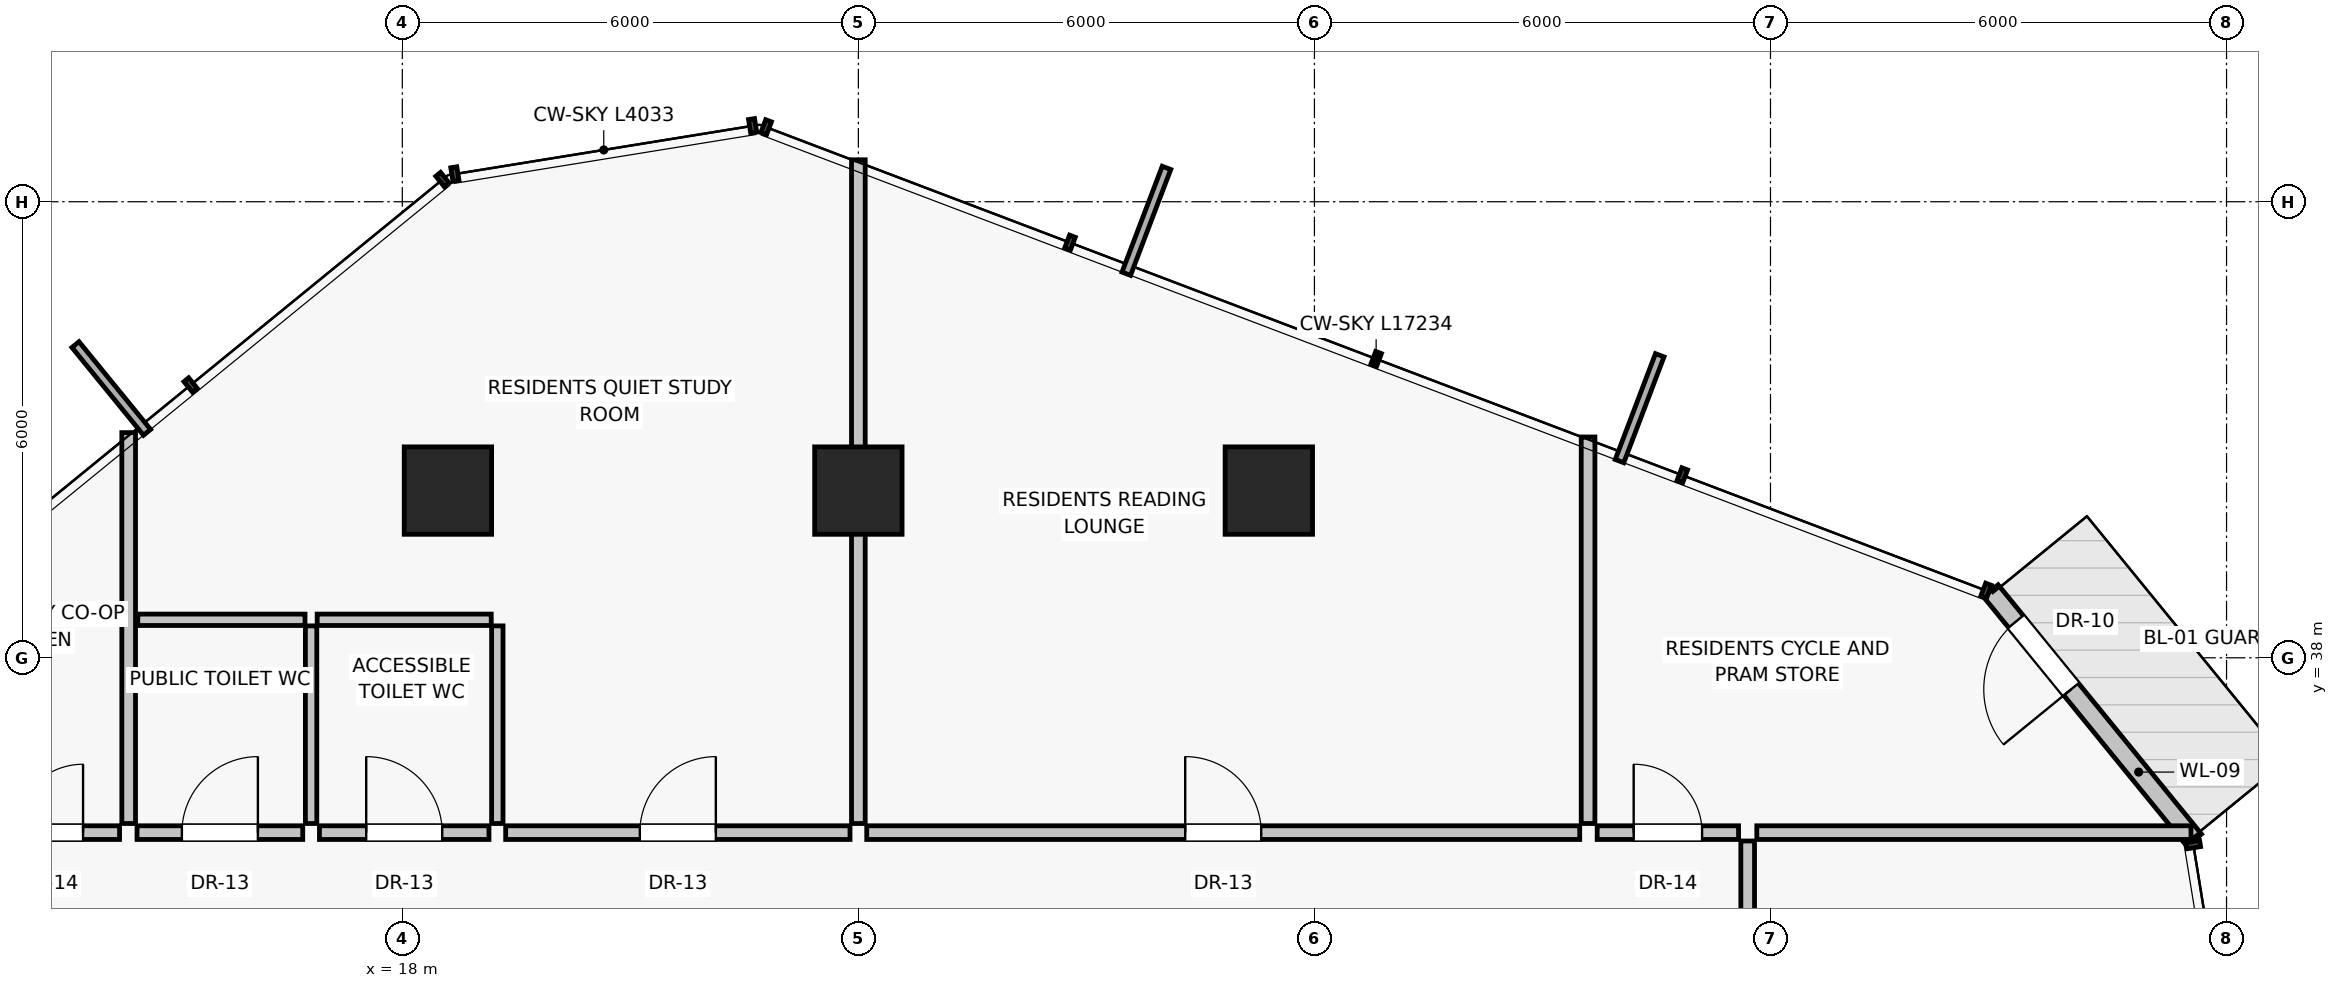
"""IFC4 building model, lengths in metres.
Left out: names, types, materials, properties, quantities, classifications, styles, units other than length and angle.
Written with IfcOpenShell. Run it as: python <this file> out.ifc"""

import sys

from ifc_helpers import new_model, si_unit, direction, frame, frame_2d, origin, origin_2d, place, context, subcontext, project, spatial, rectangle, extrude, source, transform, mapped, element, fill, save


model = new_model("IFC4")
c1 = context("Model", 3, precision=1e-05, world=origin(), true_north=direction((0.0, 1.0)))
c2 = subcontext(c1, "Body", "Model", "MODEL_VIEW")
j1 = project(units=[si_unit("LENGTHUNIT", "METRE"), si_unit("PLANEANGLEUNIT", "RADIAN")], contexts=[c1])
p1 = place(None, origin())
s1 = spatial("IfcSite", under=j1, at=p1, CompositionType="ELEMENT")
p2 = place(p1, origin())
s2 = spatial("IfcBuilding", under=s1, at=p2, CompositionType="ELEMENT")
p3 = place(p2, frame((0.0, 0.0, 158.75)))
s3 = spatial("IfcBuildingStorey", under=s2, at=p3, CompositionType="ELEMENT", Elevation=158.75)
for number, where, z_axis, x_axis in (
    (1, (29.4, 40.2, 0.0), (0.0, 0.0, 1.0), (1.0, 0.0, 0.0)),
    (2, (24.0, 40.2, 0.0), (0.0, 0.0, 1.0), (1.0, 0.0, 0.0)),
    (3, (18.6, 40.2, 0.0), (0.0, 0.0, 1.0), (1.0, 0.0, 0.0)),
):
    element("IfcColumn", number, at=place(p3, frame(where, z_axis=z_axis, x_axis=x_axis)), inside=s3, PredefinedType="COLUMN", context=c2, shape_type="SweptSolid", body=[
        extrude(rectangle(XDim=1.15, YDim=1.15, at=origin_2d()), origin(), (0.0, 0.0, 1.0), 4.3),
    ])
p4 = place(p3, frame((41.574, 35.602, 0.0), z_axis=(0.0, 0.0, 1.0), x_axis=(-0.632059289804, 0.774920030824, 0.0)))
e4 = element("IfcWall", 4, at=p4, inside=s3, PredefinedType="SOLIDWALL", context=c2, shape_type="SweptSolid", body=[
    extrude(rectangle(XDim=4.233, YDim=0.25, at=frame_2d((2.117, 0.0))), origin(), (0.0, 0.0, 1.0), 4.05),
])
p5 = place(p4, frame((2.56, 0.0, 0.0)))
e5 = element("IfcOpeningElement", 5, at=p5, cuts=e4, PredefinedType="OPENING", context=c2, shape_type="SweptSolid", body=[
    extrude(rectangle(XDim=1.15, YDim=2.25, at=frame_2d((0.575, 1.125))), frame((0.0, 0.135, 0.0), z_axis=(0.0, -1.0, 0.0), x_axis=(1.0, 0.0, 0.0)), (0.0, 0.0, 1.0), 0.27),
])
p6 = place(p3, frame((14.4, 35.82, 0.0), z_axis=(0.0, 0.0, 1.0), x_axis=(0.0, 1.0, 0.0)))
e6 = element("IfcWall", 6, at=p6, inside=s3, PredefinedType="PARTITIONING", context=c2, shape_type="SweptSolid", body=[
    extrude(rectangle(XDim=5.142, YDim=0.18, at=frame_2d((2.571, 0.0))), origin(), (0.0, 0.0, 1.0), 4.05),
])
p7 = place(p3, frame((33.6, 35.82, 0.0), z_axis=(0.0, 0.0, 1.0), x_axis=(0.0, 1.0, 0.0)))
e7 = element("IfcWall", 7, at=p7, inside=s3, PredefinedType="PARTITIONING", context=c2, shape_type="SweptSolid", body=[
    extrude(rectangle(XDim=5.085, YDim=0.18, at=frame_2d((2.542, 0.0))), origin(), (0.0, 0.0, 1.0), 4.05),
])
p8 = place(p3, frame((14.51, 35.7, 0.0), z_axis=(0.0, 0.0, 1.0), x_axis=(1.0, 0.0, 0.0)))
e8 = element("IfcWall", 8, at=p8, inside=s3, PredefinedType="PARTITIONING", context=c2, shape_type="SweptSolid", body=[
    extrude(rectangle(XDim=2.18, YDim=0.18, at=frame_2d((1.09, 0.0))), origin(), (0.0, 0.0, 1.0), 4.05),
])
p9 = place(p8, frame((0.59, 0.0, 0.0)))
e9 = element("IfcOpeningElement", 9, at=p9, cuts=e8, PredefinedType="OPENING", context=c2, shape_type="SweptSolid", body=[
    extrude(rectangle(XDim=1.0, YDim=2.01, at=frame_2d((0.5, 1.005))), frame((0.0, 0.1, 0.0), z_axis=(0.0, -1.0, 0.0), x_axis=(1.0, 0.0, 0.0)), (0.0, 0.0, 1.0), 0.2),
])
p10 = place(p3, frame((16.91, 35.7, 0.0), z_axis=(0.0, 0.0, 1.0), x_axis=(1.0, 0.0, 0.0)))
e10 = element("IfcWall", 10, at=p10, inside=s3, PredefinedType="PARTITIONING", context=c2, shape_type="SweptSolid", body=[
    extrude(rectangle(XDim=2.23, YDim=0.18, at=frame_2d((1.115, 0.0))), origin(), (0.0, 0.0, 1.0), 3.63),
])
p11 = place(p10, frame((0.615, 0.0, 0.0)))
e11 = element("IfcOpeningElement", 11, at=p11, cuts=e10, PredefinedType="OPENING", context=c2, shape_type="SweptSolid", body=[
    extrude(rectangle(XDim=1.0, YDim=2.01, at=frame_2d((0.5, 1.005))), frame((0.0, 0.1, 0.0), z_axis=(0.0, -1.0, 0.0), x_axis=(1.0, 0.0, 0.0)), (0.0, 0.0, 1.0), 0.2),
])
p12 = place(p3, frame((19.36, 35.7, 0.0), z_axis=(0.0, 0.0, 1.0), x_axis=(1.0, 0.0, 0.0)))
e12 = element("IfcWall", 12, at=p12, inside=s3, PredefinedType="PARTITIONING", context=c2, shape_type="SweptSolid", body=[
    extrude(rectangle(XDim=4.53, YDim=0.18, at=frame_2d((2.265, 0.0))), origin(), (0.0, 0.0, 1.0), 3.63),
])
p13 = place(p12, frame((1.765, 0.0, 0.0)))
e13 = element("IfcOpeningElement", 13, at=p13, cuts=e12, PredefinedType="OPENING", context=c2, shape_type="SweptSolid", body=[
    extrude(rectangle(XDim=1.0, YDim=2.01, at=frame_2d((0.5, 1.005))), frame((0.0, 0.1, 0.0), z_axis=(0.0, -1.0, 0.0), x_axis=(1.0, 0.0, 0.0)), (0.0, 0.0, 1.0), 0.2),
])
p14 = place(p3, frame((24.11, 35.7, 0.0), z_axis=(0.0, 0.0, 1.0), x_axis=(1.0, 0.0, 0.0)))
e14 = element("IfcWall", 14, at=p14, inside=s3, PredefinedType="PARTITIONING", context=c2, shape_type="SweptSolid", body=[
    extrude(rectangle(XDim=9.38, YDim=0.18, at=frame_2d((4.69, 0.0))), origin(), (0.0, 0.0, 1.0), 3.63),
])
p15 = place(p14, frame((4.19, 0.0, 0.0)))
e15 = element("IfcOpeningElement", 15, at=p15, cuts=e14, PredefinedType="OPENING", context=c2, shape_type="SweptSolid", body=[
    extrude(rectangle(XDim=1.0, YDim=2.01, at=frame_2d((0.5, 1.005))), frame((0.0, 0.1, 0.0), z_axis=(0.0, -1.0, 0.0), x_axis=(1.0, 0.0, 0.0)), (0.0, 0.0, 1.0), 0.2),
])
for number, where, z_axis, x_axis in (
    (16, (16.8, 35.82, 0.0), (0.0, 0.0, 1.0), (0.0, 1.0, 0.0)),
    (17, (19.25, 35.82, 0.0), (0.0, 0.0, 1.0), (0.0, 1.0, 0.0)),
):
    element("IfcWall", number, at=place(p3, frame(where, z_axis=z_axis, x_axis=x_axis)), inside=s3, PredefinedType="PARTITIONING", context=c2, shape_type="SweptSolid", body=[
        extrude(rectangle(XDim=2.6, YDim=0.15, at=frame_2d((1.3, 0.0))), origin(), (0.0, 0.0, 1.0), 4.05),
    ])
p16 = place(p3, frame((14.52, 38.5, 0.0), z_axis=(0.0, 0.0, 1.0), x_axis=(1.0, 0.0, 0.0)))
e18 = element("IfcWall", 18, at=p16, inside=s3, PredefinedType="PARTITIONING", context=c2, shape_type="SweptSolid", body=[
    extrude(rectangle(XDim=2.2, YDim=0.15, at=frame_2d((1.1, 0.0))), origin(), (0.0, 0.0, 1.0), 4.05),
])
p17 = place(p3, frame((16.88, 38.5, 0.0), z_axis=(0.0, 0.0, 1.0), x_axis=(1.0, 0.0, 0.0)))
e19 = element("IfcWall", 19, at=p17, inside=s3, PredefinedType="PARTITIONING", context=c2, shape_type="SweptSolid", body=[
    extrude(rectangle(XDim=2.29, YDim=0.15, at=frame_2d((1.145, 0.0))), origin(), (0.0, 0.0, 1.0), 4.05),
])
p18 = place(p3, frame((24.0, 35.82, 0.0), z_axis=(0.0, 0.0, 1.0), x_axis=(0.0, 1.0, 0.0)))
e20 = element("IfcWall", 20, at=p18, inside=s3, PredefinedType="PARTITIONING", context=c2, shape_type="SweptSolid", body=[
    extrude(rectangle(XDim=8.732, YDim=0.18, at=frame_2d((4.366, 0.0))), origin(), (0.0, 0.0, 1.0), 4.05),
])
p19 = place(p3, frame((35.82, 35.7, 0.0), z_axis=(0.0, 0.0, 1.0), x_axis=(1.0, 0.0, 0.0)))
e21 = element("IfcWall", 21, at=p19, inside=s3, PredefinedType="PARTITIONING", context=c2, shape_type="SweptSolid", body=[
    extrude(rectangle(XDim=5.712, YDim=0.18, at=frame_2d((2.856, 0.0))), origin(), (0.0, 0.0, 1.0), 4.05),
])
p20 = place(p3, frame((35.7, 25.662, 0.0), z_axis=(0.0, 0.0, 1.0), x_axis=(0.0, 1.0, 0.0)))
e22 = element("IfcWall", 22, at=p20, inside=s3, PredefinedType="PARTITIONING", context=c2, shape_type="SweptSolid", body=[
    extrude(rectangle(XDim=9.928, YDim=0.18, at=frame_2d((4.964, 0.0))), origin(), (0.0, 0.0, 1.0), 3.63),
])
p21 = place(p20, frame((4.464, 0.0, 0.0)))
e23 = element("IfcOpeningElement", 23, at=p21, cuts=e22, PredefinedType="OPENING", context=c2, shape_type="SweptSolid", body=[
    extrude(rectangle(XDim=1.0, YDim=2.01, at=frame_2d((0.5, 1.005))), frame((0.0, 0.1, 0.0), z_axis=(0.0, -1.0, 0.0), x_axis=(1.0, 0.0, 0.0)), (0.0, 0.0, 1.0), 0.2),
])
p22 = place(p3, frame((12.42, 35.7, 0.0), z_axis=(0.0, 0.0, 1.0), x_axis=(1.0, 0.0, 0.0)))
e24 = element("IfcWall", 24, at=p22, inside=s3, PredefinedType="PARTITIONING", context=c2, shape_type="SweptSolid", body=[
    extrude(rectangle(XDim=1.86, YDim=0.18, at=frame_2d((0.93, 0.0))), origin(), (0.0, 0.0, 1.0), 4.05),
])
p23 = place(p22, frame((0.48, 0.0, 0.0)))
e25 = element("IfcOpeningElement", 25, at=p23, cuts=e24, PredefinedType="OPENING", context=c2, shape_type="SweptSolid", body=[
    extrude(rectangle(XDim=0.9, YDim=2.01, at=frame_2d((0.45, 1.005))), frame((0.0, 0.1, 0.0), z_axis=(0.0, -1.0, 0.0), x_axis=(1.0, 0.0, 0.0)), (0.0, 0.0, 1.0), 0.2),
])
p24 = place(p3, frame((33.72, 35.7, 0.0), z_axis=(0.0, 0.0, 1.0), x_axis=(1.0, 0.0, 0.0)))
e26 = element("IfcWall", 26, at=p24, inside=s3, PredefinedType="PARTITIONING", context=c2, shape_type="SweptSolid", body=[
    extrude(rectangle(XDim=1.86, YDim=0.18, at=frame_2d((0.93, 0.0))), origin(), (0.0, 0.0, 1.0), 4.05),
])
p25 = place(p24, frame((0.48, 0.0, 0.0)))
e27 = element("IfcOpeningElement", 27, at=p25, cuts=e26, PredefinedType="OPENING", context=c2, shape_type="SweptSolid", body=[
    extrude(rectangle(XDim=0.9, YDim=2.01, at=frame_2d((0.45, 1.005))), frame((0.0, 0.1, 0.0), z_axis=(0.0, -1.0, 0.0), x_axis=(1.0, 0.0, 0.0)), (0.0, 0.0, 1.0), 0.2),
])
m1 = source(origin(), c2, "Body", "SweptSolid", [
    extrude(rectangle(XDim=1.15, YDim=2.25, at=frame_2d((0.575, 1.125))), frame((0.0, 0.025, 0.0), z_axis=(0.0, -1.0, 0.0), x_axis=(1.0, 0.0, 0.0)), (0.0, 0.0, 1.0), 0.05),
])
p26 = place(p5, frame((1.15, 0.0, 0.0), z_axis=(0.0, 0.0, 1.0), x_axis=(-1.0, 0.0, 0.0)))
e28 = element("IfcDoor", 28, at=p26, inside=s3, OperationType="SINGLE_SWING_LEFT", PredefinedType="DOOR", context=c2, shape_type="MappedRepresentation", body=[
    mapped(m1, transform((0.0, 0.0, 0.0), scale=1.0)),
])
fill(e5, e28)
m2 = source(origin(), c2, "Body", "SweptSolid", [
    extrude(rectangle(XDim=1.0, YDim=2.01, at=frame_2d((0.5, 1.005))), frame((0.0, 0.025, 0.0), z_axis=(0.0, -1.0, 0.0), x_axis=(1.0, 0.0, 0.0)), (0.0, 0.0, 1.0), 0.05),
])
p27 = place(p9, origin())
e29 = element("IfcDoor", 29, at=p27, inside=s3, OperationType="SINGLE_SWING_RIGHT", PredefinedType="DOOR", context=c2, shape_type="MappedRepresentation", body=[
    mapped(m2, transform((0.0, 0.0, 0.0), scale=1.0)),
])
fill(e9, e29)
p28 = place(p11, origin())
e30 = element("IfcDoor", 30, at=p28, inside=s3, OperationType="SINGLE_SWING_LEFT", PredefinedType="DOOR", context=c2, shape_type="MappedRepresentation", body=[
    mapped(m2, transform((0.0, 0.0, 0.0), scale=1.0)),
])
fill(e11, e30)
p29 = place(p13, origin())
e31 = element("IfcDoor", 31, at=p29, inside=s3, OperationType="SINGLE_SWING_RIGHT", PredefinedType="DOOR", context=c2, shape_type="MappedRepresentation", body=[
    mapped(m2, transform((0.0, 0.0, 0.0), scale=1.0)),
])
fill(e13, e31)
p30 = place(p15, origin())
e32 = element("IfcDoor", 32, at=p30, inside=s3, OperationType="SINGLE_SWING_LEFT", PredefinedType="DOOR", context=c2, shape_type="MappedRepresentation", body=[
    mapped(m2, transform((0.0, 0.0, 0.0), scale=1.0)),
])
fill(e15, e32)
m3 = source(origin(), c2, "Body", "SweptSolid", [
    extrude(rectangle(XDim=0.9, YDim=2.01, at=frame_2d((0.45, 1.005))), frame((0.0, 0.025, 0.0), z_axis=(0.0, -1.0, 0.0), x_axis=(1.0, 0.0, 0.0)), (0.0, 0.0, 1.0), 0.05),
])
p31 = place(p23, origin())
e33 = element("IfcDoor", 33, at=p31, inside=s3, OperationType="SINGLE_SWING_RIGHT", PredefinedType="DOOR", context=c2, shape_type="MappedRepresentation", body=[
    mapped(m3, transform((0.0, 0.0, 0.0), scale=1.0)),
])
fill(e25, e33)
p32 = place(p25, origin())
e34 = element("IfcDoor", 34, at=p32, inside=s3, OperationType="SINGLE_SWING_LEFT", PredefinedType="DOOR", context=c2, shape_type="MappedRepresentation", body=[
    mapped(m3, transform((0.0, 0.0, 0.0), scale=1.0)),
])
fill(e27, e34)
save(model, sys.argv[1])
